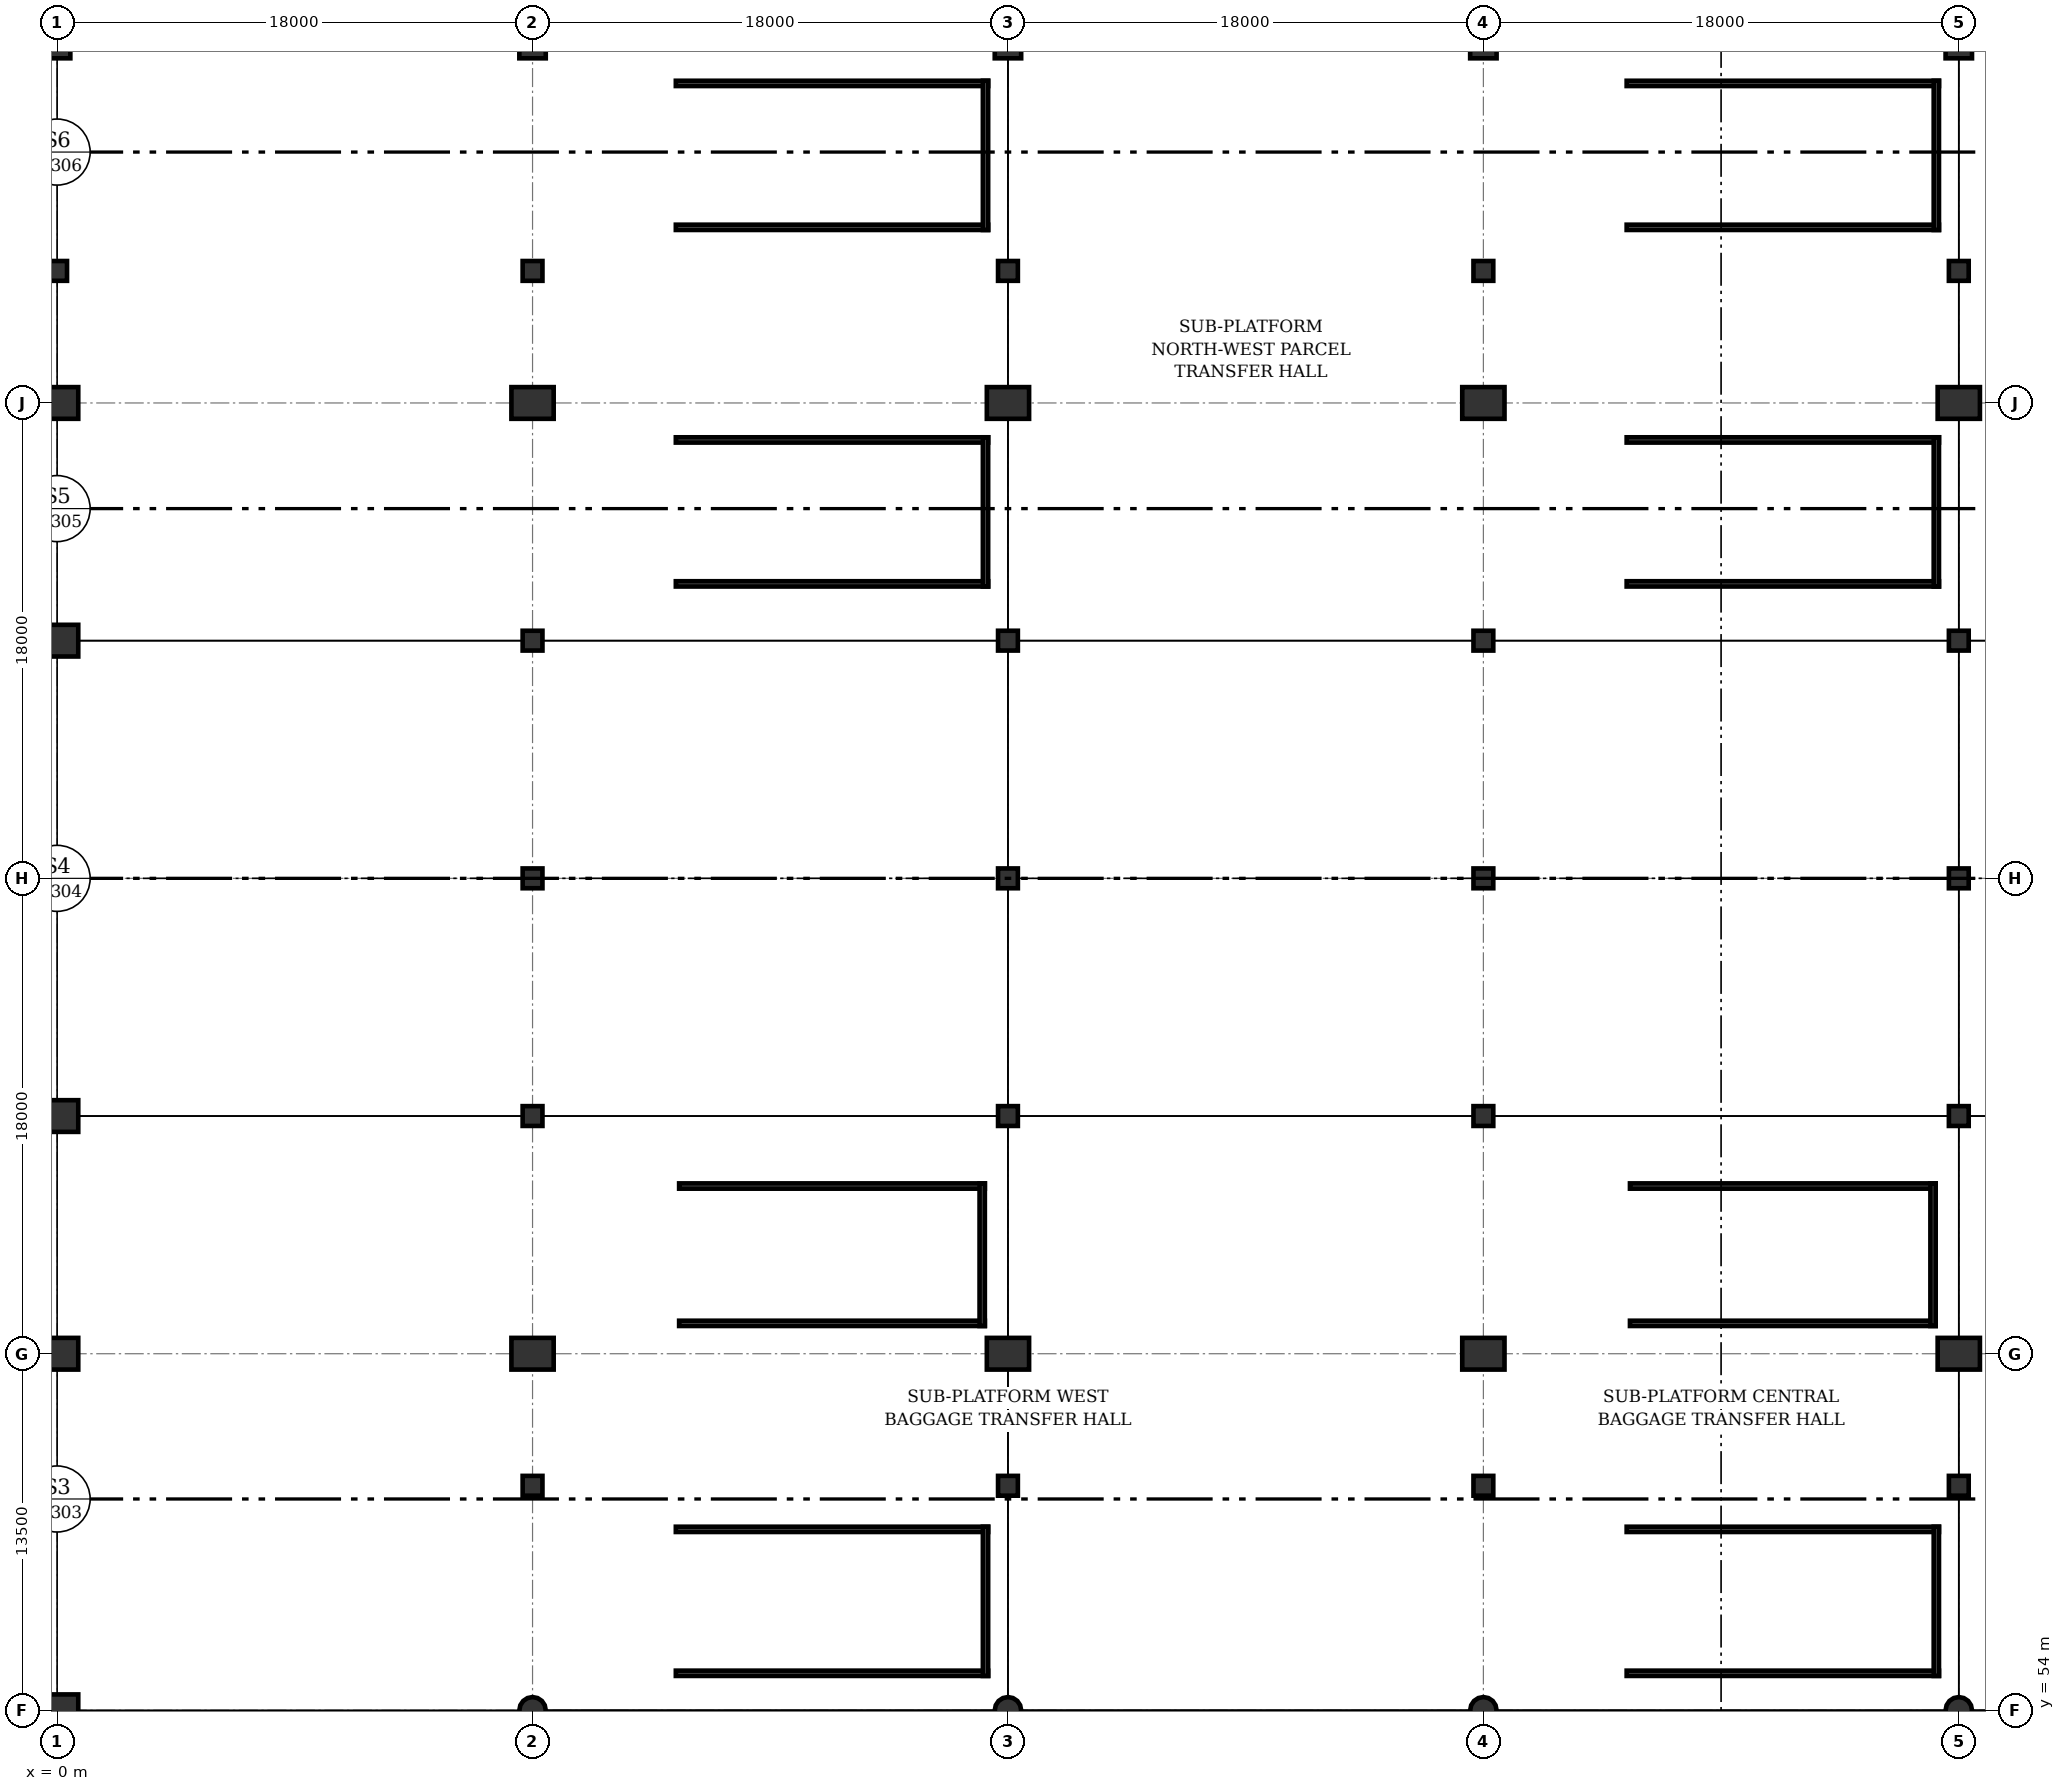
"""IFC4 building model, lengths in metres.
Left out: names, types, materials, properties, quantities, classifications, styles, units other than length and angle.
Written with IfcOpenShell. Run it as: python <this file> out.ifc"""

import sys

from ifc_helpers import new_model, si_unit, direction, frame, frame_2d, origin, origin_2d, place, context, subcontext, project, spatial, rectangle, circle, extrude, element, save


model = new_model("IFC4")
c1 = context("Model", 3, precision=1e-05, world=origin(), true_north=direction((0.0, 1.0)))
c2 = subcontext(c1, "Body", "Model", "MODEL_VIEW")
j1 = project(units=[si_unit("LENGTHUNIT", "METRE"), si_unit("PLANEANGLEUNIT", "RADIAN")], contexts=[c1])
p1 = place(None, origin())
s1 = spatial("IfcSite", under=j1, at=p1, CompositionType="ELEMENT")
p2 = place(p1, origin())
s2 = spatial("IfcBuilding", under=s1, at=p2, CompositionType="ELEMENT")
p3 = place(p2, frame((0.0, 0.0, -5.4)))
s3 = spatial("IfcBuildingStorey", under=s2, at=p3, CompositionType="ELEMENT", Elevation=-5.4)
for number, where, z_axis, x_axis in (
    (1, (0.0, 54.0, 0.0), (0.0, 0.0, 1.0), (1.0, 0.0, 0.0)),
    (2, (0.0, 67.5, 0.0), (0.0, 0.0, 1.0), (1.0, 0.0, 0.0)),
    (3, (0.0, 76.5, 0.0), (0.0, 0.0, 1.0), (1.0, 0.0, 0.0)),
    (4, (0.0, 85.5, 0.0), (0.0, 0.0, 1.0), (1.0, 0.0, 0.0)),
    (5, (0.0, 94.5, 0.0), (0.0, 0.0, 1.0), (1.0, 0.0, 0.0)),
    (6, (0.0, 103.5, 0.0), (0.0, 0.0, 1.0), (1.0, 0.0, 0.0)),
):
    element("IfcColumn", number, at=place(p3, frame(where, z_axis=z_axis, x_axis=x_axis)), inside=s3, PredefinedType="COLUMN", context=c2, shape_type="SweptSolid", body=[
        extrude(rectangle(XDim=1.6, YDim=1.2, at=origin_2d()), origin(), (0.0, 0.0, 1.0), 5.4),
    ])
p4 = place(p3, frame((0.0, 117.0, 0.0), z_axis=(0.0, 0.0, 1.0), x_axis=(1.0, 0.0, 0.0)))
e7 = element("IfcColumn", 7, at=p4, inside=s3, PredefinedType="COLUMN", context=c2, shape_type="SweptSolid", body=[
    extrude(rectangle(XDim=1.0, YDim=0.9, at=origin_2d()), origin(), (0.0, 0.0, 1.0), 5.4),
])
p5 = place(p3, frame((18.0, 54.0, 0.0), z_axis=(0.0, 0.0, 1.0), x_axis=(1.0, 0.0, 0.0)))
e8 = element("IfcColumn", 8, at=p5, inside=s3, PredefinedType="COLUMN", context=c2, shape_type="SweptSolid", body=[
    extrude(circle(Radius=0.5, at=origin_2d()), origin(), (0.0, 0.0, 1.0), 5.4),
])
for number, where, z_axis, x_axis in (
    (9, (18.0, 67.5, 0.0), (0.0, 0.0, 1.0), (1.0, 0.0, 0.0)),
    (10, (18.0, 103.5, 0.0), (0.0, 0.0, 1.0), (1.0, 0.0, 0.0)),
):
    element("IfcColumn", number, at=place(p3, frame(where, z_axis=z_axis, x_axis=x_axis)), inside=s3, PredefinedType="COLUMN", context=c2, shape_type="SweptSolid", body=[
        extrude(rectangle(XDim=1.6, YDim=1.2, at=origin_2d()), origin(), (0.0, 0.0, 1.0), 5.4),
    ])
p6 = place(p3, frame((18.0, 117.0, 0.0), z_axis=(0.0, 0.0, 1.0), x_axis=(1.0, 0.0, 0.0)))
e11 = element("IfcColumn", 11, at=p6, inside=s3, PredefinedType="COLUMN", context=c2, shape_type="SweptSolid", body=[
    extrude(rectangle(XDim=1.0, YDim=0.9, at=origin_2d()), origin(), (0.0, 0.0, 1.0), 5.4),
])
p7 = place(p3, frame((36.0, 54.0, 0.0), z_axis=(0.0, 0.0, 1.0), x_axis=(1.0, 0.0, 0.0)))
e12 = element("IfcColumn", 12, at=p7, inside=s3, PredefinedType="COLUMN", context=c2, shape_type="SweptSolid", body=[
    extrude(circle(Radius=0.5, at=origin_2d()), origin(), (0.0, 0.0, 1.0), 5.4),
])
for number, where, z_axis, x_axis in (
    (13, (36.0, 67.5, 0.0), (0.0, 0.0, 1.0), (1.0, 0.0, 0.0)),
    (14, (36.0, 103.5, 0.0), (0.0, 0.0, 1.0), (1.0, 0.0, 0.0)),
):
    element("IfcColumn", number, at=place(p3, frame(where, z_axis=z_axis, x_axis=x_axis)), inside=s3, PredefinedType="COLUMN", context=c2, shape_type="SweptSolid", body=[
        extrude(rectangle(XDim=1.6, YDim=1.2, at=origin_2d()), origin(), (0.0, 0.0, 1.0), 5.4),
    ])
p8 = place(p3, frame((36.0, 117.0, 0.0), z_axis=(0.0, 0.0, 1.0), x_axis=(1.0, 0.0, 0.0)))
e15 = element("IfcColumn", 15, at=p8, inside=s3, PredefinedType="COLUMN", context=c2, shape_type="SweptSolid", body=[
    extrude(rectangle(XDim=1.0, YDim=0.9, at=origin_2d()), origin(), (0.0, 0.0, 1.0), 5.4),
])
p9 = place(p3, frame((54.0, 54.0, 0.0), z_axis=(0.0, 0.0, 1.0), x_axis=(1.0, 0.0, 0.0)))
e16 = element("IfcColumn", 16, at=p9, inside=s3, PredefinedType="COLUMN", context=c2, shape_type="SweptSolid", body=[
    extrude(circle(Radius=0.5, at=origin_2d()), origin(), (0.0, 0.0, 1.0), 5.4),
])
for number, where, z_axis, x_axis in (
    (17, (54.0, 67.5, 0.0), (0.0, 0.0, 1.0), (1.0, 0.0, 0.0)),
    (18, (54.0, 103.5, 0.0), (0.0, 0.0, 1.0), (1.0, 0.0, 0.0)),
):
    element("IfcColumn", number, at=place(p3, frame(where, z_axis=z_axis, x_axis=x_axis)), inside=s3, PredefinedType="COLUMN", context=c2, shape_type="SweptSolid", body=[
        extrude(rectangle(XDim=1.6, YDim=1.2, at=origin_2d()), origin(), (0.0, 0.0, 1.0), 5.4),
    ])
p10 = place(p3, frame((54.0, 117.0, 0.0), z_axis=(0.0, 0.0, 1.0), x_axis=(1.0, 0.0, 0.0)))
e19 = element("IfcColumn", 19, at=p10, inside=s3, PredefinedType="COLUMN", context=c2, shape_type="SweptSolid", body=[
    extrude(rectangle(XDim=1.0, YDim=0.9, at=origin_2d()), origin(), (0.0, 0.0, 1.0), 5.4),
])
p11 = place(p3, frame((72.0, 54.0, 0.0), z_axis=(0.0, 0.0, 1.0), x_axis=(1.0, 0.0, 0.0)))
e20 = element("IfcColumn", 20, at=p11, inside=s3, PredefinedType="COLUMN", context=c2, shape_type="SweptSolid", body=[
    extrude(circle(Radius=0.5, at=origin_2d()), origin(), (0.0, 0.0, 1.0), 5.4),
])
for number, where, z_axis, x_axis in (
    (21, (72.0, 67.5, 0.0), (0.0, 0.0, 1.0), (1.0, 0.0, 0.0)),
    (22, (72.0, 103.5, 0.0), (0.0, 0.0, 1.0), (1.0, 0.0, 0.0)),
):
    element("IfcColumn", number, at=place(p3, frame(where, z_axis=z_axis, x_axis=x_axis)), inside=s3, PredefinedType="COLUMN", context=c2, shape_type="SweptSolid", body=[
        extrude(rectangle(XDim=1.6, YDim=1.2, at=origin_2d()), origin(), (0.0, 0.0, 1.0), 5.4),
    ])
p12 = place(p3, frame((72.0, 117.0, 0.0), z_axis=(0.0, 0.0, 1.0), x_axis=(1.0, 0.0, 0.0)))
e23 = element("IfcColumn", 23, at=p12, inside=s3, PredefinedType="COLUMN", context=c2, shape_type="SweptSolid", body=[
    extrude(rectangle(XDim=1.0, YDim=0.9, at=origin_2d()), origin(), (0.0, 0.0, 1.0), 5.4),
])
for number, where, z_axis, x_axis in (
    (24, (0.0, 62.5, 0.0), (0.0, 0.0, 1.0), (1.0, 0.0, 0.0)),
    (25, (18.0, 62.5, 0.0), (0.0, 0.0, 1.0), (1.0, 0.0, 0.0)),
    (26, (36.0, 62.5, 0.0), (0.0, 0.0, 1.0), (1.0, 0.0, 0.0)),
    (27, (54.0, 62.5, 0.0), (0.0, 0.0, 1.0), (1.0, 0.0, 0.0)),
    (28, (72.0, 62.5, 0.0), (0.0, 0.0, 1.0), (1.0, 0.0, 0.0)),
):
    element("IfcColumn", number, at=place(p3, frame(where, z_axis=z_axis, x_axis=x_axis)), inside=s3, PredefinedType="COLUMN", context=c2, shape_type="SweptSolid", body=[
        extrude(rectangle(XDim=0.75, YDim=0.75, at=origin_2d()), origin(), (0.0, 0.0, 1.0), 5.02),
    ])
for number, where, z_axis, x_axis in (
    (29, (18.0, 76.5, 0.0), (0.0, 0.0, 1.0), (1.0, 0.0, 0.0)),
    (30, (36.0, 76.5, 0.0), (0.0, 0.0, 1.0), (1.0, 0.0, 0.0)),
    (31, (54.0, 76.5, 0.0), (0.0, 0.0, 1.0), (1.0, 0.0, 0.0)),
    (32, (72.0, 76.5, 0.0), (0.0, 0.0, 1.0), (1.0, 0.0, 0.0)),
    (33, (18.0, 85.5, 0.0), (0.0, 0.0, 1.0), (1.0, 0.0, 0.0)),
    (34, (36.0, 85.5, 0.0), (0.0, 0.0, 1.0), (1.0, 0.0, 0.0)),
    (35, (54.0, 85.5, 0.0), (0.0, 0.0, 1.0), (1.0, 0.0, 0.0)),
    (36, (72.0, 85.5, 0.0), (0.0, 0.0, 1.0), (1.0, 0.0, 0.0)),
    (37, (18.0, 94.5, 0.0), (0.0, 0.0, 1.0), (1.0, 0.0, 0.0)),
    (38, (36.0, 94.5, 0.0), (0.0, 0.0, 1.0), (1.0, 0.0, 0.0)),
    (39, (54.0, 94.5, 0.0), (0.0, 0.0, 1.0), (1.0, 0.0, 0.0)),
    (40, (72.0, 94.5, 0.0), (0.0, 0.0, 1.0), (1.0, 0.0, 0.0)),
):
    element("IfcColumn", number, at=place(p3, frame(where, z_axis=z_axis, x_axis=x_axis)), inside=s3, PredefinedType="COLUMN", context=c2, shape_type="SweptSolid", body=[
        extrude(rectangle(XDim=0.75, YDim=0.75, at=origin_2d()), origin(), (0.0, 0.0, 1.0), 3.5),
    ])
for number, where, z_axis, x_axis in (
    (41, (0.0, 108.5, 0.0), (0.0, 0.0, 1.0), (1.0, 0.0, 0.0)),
    (42, (18.0, 108.5, 0.0), (0.0, 0.0, 1.0), (1.0, 0.0, 0.0)),
    (43, (36.0, 108.5, 0.0), (0.0, 0.0, 1.0), (1.0, 0.0, 0.0)),
    (44, (54.0, 108.5, 0.0), (0.0, 0.0, 1.0), (1.0, 0.0, 0.0)),
    (45, (72.0, 108.5, 0.0), (0.0, 0.0, 1.0), (1.0, 0.0, 0.0)),
):
    element("IfcColumn", number, at=place(p3, frame(where, z_axis=z_axis, x_axis=x_axis)), inside=s3, PredefinedType="COLUMN", context=c2, shape_type="SweptSolid", body=[
        extrude(rectangle(XDim=0.75, YDim=0.75, at=origin_2d()), origin(), (0.0, 0.0, 1.0), 5.02),
    ])
for number, where, z_axis, x_axis in (
    (46, (23.425, 55.4, 0.0), (0.0, 0.0, 1.0), (1.0, 0.0, 0.0)),
    (47, (35.25, 60.85, 0.0), (0.0, 0.0, 1.0), (-1.0, 0.0, 0.0)),
):
    element("IfcWall", number, at=place(p3, frame(where, z_axis=z_axis, x_axis=x_axis)), inside=s3, PredefinedType="SOLIDWALL", context=c2, shape_type="SweptSolid", body=[
        extrude(rectangle(XDim=11.825, YDim=0.2, at=frame_2d((5.913, 0.0))), origin(), (0.0, 0.0, 1.0), 5.02),
    ])
p13 = place(p3, frame((35.15, 55.3, 0.0), z_axis=(0.0, 0.0, 1.0), x_axis=(0.0, 1.0, 0.0)))
e48 = element("IfcWall", 48, at=p13, inside=s3, PredefinedType="SOLIDWALL", context=c2, shape_type="SweptSolid", body=[
    extrude(rectangle(XDim=5.65, YDim=0.2, at=frame_2d((2.825, 0.0))), origin(), (0.0, 0.0, 1.0), 5.02),
])
for number, where, z_axis, x_axis in (
    (49, (59.425, 55.4, 0.0), (0.0, 0.0, 1.0), (1.0, 0.0, 0.0)),
    (50, (71.25, 60.85, 0.0), (0.0, 0.0, 1.0), (-1.0, 0.0, 0.0)),
):
    element("IfcWall", number, at=place(p3, frame(where, z_axis=z_axis, x_axis=x_axis)), inside=s3, PredefinedType="SOLIDWALL", context=c2, shape_type="SweptSolid", body=[
        extrude(rectangle(XDim=11.825, YDim=0.2, at=frame_2d((5.913, 0.0))), origin(), (0.0, 0.0, 1.0), 5.02),
    ])
p14 = place(p3, frame((71.15, 55.3, 0.0), z_axis=(0.0, 0.0, 1.0), x_axis=(0.0, 1.0, 0.0)))
e51 = element("IfcWall", 51, at=p14, inside=s3, PredefinedType="SOLIDWALL", context=c2, shape_type="SweptSolid", body=[
    extrude(rectangle(XDim=5.65, YDim=0.2, at=frame_2d((2.825, 0.0))), origin(), (0.0, 0.0, 1.0), 5.02),
])
for number, where, z_axis, x_axis in (
    (52, (23.55, 68.65, 0.0), (0.0, 0.0, 1.0), (1.0, 0.0, 0.0)),
    (53, (35.125, 73.85, 0.0), (0.0, 0.0, 1.0), (-1.0, 0.0, 0.0)),
):
    element("IfcWall", number, at=place(p3, frame(where, z_axis=z_axis, x_axis=x_axis)), inside=s3, PredefinedType="SOLIDWALL", context=c2, shape_type="SweptSolid", body=[
        extrude(rectangle(XDim=11.575, YDim=0.2, at=frame_2d((5.788, 0.0))), origin(), (0.0, 0.0, 1.0), 5.02),
    ])
p15 = place(p3, frame((35.025, 68.55, 0.0), z_axis=(0.0, 0.0, 1.0), x_axis=(0.0, 1.0, 0.0)))
e54 = element("IfcWall", 54, at=p15, inside=s3, PredefinedType="SOLIDWALL", context=c2, shape_type="SweptSolid", body=[
    extrude(rectangle(XDim=5.4, YDim=0.2, at=frame_2d((2.7, 0.0))), origin(), (0.0, 0.0, 1.0), 5.02),
])
for number, where, z_axis, x_axis in (
    (55, (59.55, 68.65, 0.0), (0.0, 0.0, 1.0), (1.0, 0.0, 0.0)),
    (56, (71.125, 73.85, 0.0), (0.0, 0.0, 1.0), (-1.0, 0.0, 0.0)),
):
    element("IfcWall", number, at=place(p3, frame(where, z_axis=z_axis, x_axis=x_axis)), inside=s3, PredefinedType="SOLIDWALL", context=c2, shape_type="SweptSolid", body=[
        extrude(rectangle(XDim=11.575, YDim=0.2, at=frame_2d((5.788, 0.0))), origin(), (0.0, 0.0, 1.0), 5.02),
    ])
p16 = place(p3, frame((71.025, 68.55, 0.0), z_axis=(0.0, 0.0, 1.0), x_axis=(0.0, 1.0, 0.0)))
e57 = element("IfcWall", 57, at=p16, inside=s3, PredefinedType="SOLIDWALL", context=c2, shape_type="SweptSolid", body=[
    extrude(rectangle(XDim=5.4, YDim=0.2, at=frame_2d((2.7, 0.0))), origin(), (0.0, 0.0, 1.0), 5.02),
])
for number, where, z_axis, x_axis in (
    (58, (23.425, 96.65, 0.0), (0.0, 0.0, 1.0), (1.0, 0.0, 0.0)),
    (59, (35.25, 102.1, 0.0), (0.0, 0.0, 1.0), (-1.0, 0.0, 0.0)),
):
    element("IfcWall", number, at=place(p3, frame(where, z_axis=z_axis, x_axis=x_axis)), inside=s3, PredefinedType="SOLIDWALL", context=c2, shape_type="SweptSolid", body=[
        extrude(rectangle(XDim=11.825, YDim=0.2, at=frame_2d((5.913, 0.0))), origin(), (0.0, 0.0, 1.0), 5.02),
    ])
p17 = place(p3, frame((35.15, 96.55, 0.0), z_axis=(0.0, 0.0, 1.0), x_axis=(0.0, 1.0, 0.0)))
e60 = element("IfcWall", 60, at=p17, inside=s3, PredefinedType="SOLIDWALL", context=c2, shape_type="SweptSolid", body=[
    extrude(rectangle(XDim=5.65, YDim=0.2, at=frame_2d((2.825, 0.0))), origin(), (0.0, 0.0, 1.0), 5.02),
])
for number, where, z_axis, x_axis in (
    (61, (59.425, 96.65, 0.0), (0.0, 0.0, 1.0), (1.0, 0.0, 0.0)),
    (62, (71.25, 102.1, 0.0), (0.0, 0.0, 1.0), (-1.0, 0.0, 0.0)),
):
    element("IfcWall", number, at=place(p3, frame(where, z_axis=z_axis, x_axis=x_axis)), inside=s3, PredefinedType="SOLIDWALL", context=c2, shape_type="SweptSolid", body=[
        extrude(rectangle(XDim=11.825, YDim=0.2, at=frame_2d((5.913, 0.0))), origin(), (0.0, 0.0, 1.0), 5.02),
    ])
p18 = place(p3, frame((71.15, 96.55, 0.0), z_axis=(0.0, 0.0, 1.0), x_axis=(0.0, 1.0, 0.0)))
e63 = element("IfcWall", 63, at=p18, inside=s3, PredefinedType="SOLIDWALL", context=c2, shape_type="SweptSolid", body=[
    extrude(rectangle(XDim=5.65, YDim=0.2, at=frame_2d((2.825, 0.0))), origin(), (0.0, 0.0, 1.0), 5.02),
])
for number, where, z_axis, x_axis in (
    (64, (23.425, 110.15, 0.0), (0.0, 0.0, 1.0), (1.0, 0.0, 0.0)),
    (65, (35.25, 115.6, 0.0), (0.0, 0.0, 1.0), (-1.0, 0.0, 0.0)),
):
    element("IfcWall", number, at=place(p3, frame(where, z_axis=z_axis, x_axis=x_axis)), inside=s3, PredefinedType="SOLIDWALL", context=c2, shape_type="SweptSolid", body=[
        extrude(rectangle(XDim=11.825, YDim=0.2, at=frame_2d((5.913, 0.0))), origin(), (0.0, 0.0, 1.0), 5.02),
    ])
p19 = place(p3, frame((35.15, 110.05, 0.0), z_axis=(0.0, 0.0, 1.0), x_axis=(0.0, 1.0, 0.0)))
e66 = element("IfcWall", 66, at=p19, inside=s3, PredefinedType="SOLIDWALL", context=c2, shape_type="SweptSolid", body=[
    extrude(rectangle(XDim=5.65, YDim=0.2, at=frame_2d((2.825, 0.0))), origin(), (0.0, 0.0, 1.0), 5.02),
])
for number, where, z_axis, x_axis in (
    (67, (59.425, 110.15, 0.0), (0.0, 0.0, 1.0), (1.0, 0.0, 0.0)),
    (68, (71.25, 115.6, 0.0), (0.0, 0.0, 1.0), (-1.0, 0.0, 0.0)),
):
    element("IfcWall", number, at=place(p3, frame(where, z_axis=z_axis, x_axis=x_axis)), inside=s3, PredefinedType="SOLIDWALL", context=c2, shape_type="SweptSolid", body=[
        extrude(rectangle(XDim=11.825, YDim=0.2, at=frame_2d((5.913, 0.0))), origin(), (0.0, 0.0, 1.0), 5.02),
    ])
p20 = place(p3, frame((71.15, 110.05, 0.0), z_axis=(0.0, 0.0, 1.0), x_axis=(0.0, 1.0, 0.0)))
e69 = element("IfcWall", 69, at=p20, inside=s3, PredefinedType="SOLIDWALL", context=c2, shape_type="SweptSolid", body=[
    extrude(rectangle(XDim=5.65, YDim=0.2, at=frame_2d((2.825, 0.0))), origin(), (0.0, 0.0, 1.0), 5.02),
])
save(model, sys.argv[1])
